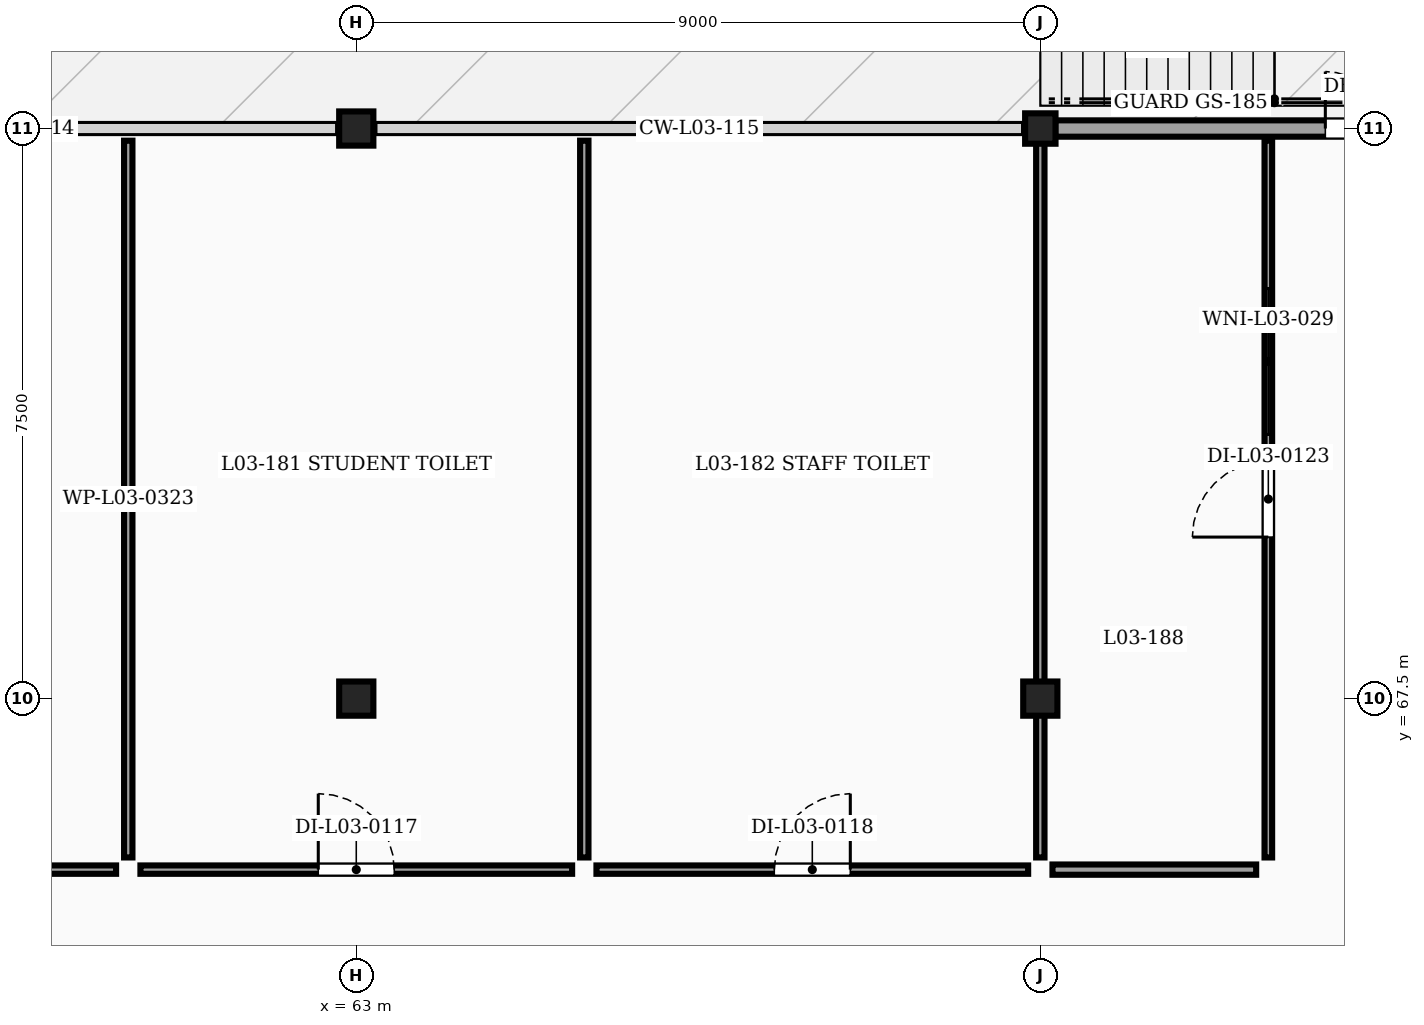
"""IFC4 building model, lengths in metres.
Left out: names, types, materials, properties, quantities, classifications, styles, units other than length and angle.
Written with IfcOpenShell. Run it as: python <this file> out.ifc"""

import sys

from ifc_helpers import new_model, si_unit, direction, frame, frame_2d, origin, origin_2d, place, context, subcontext, project, spatial, rectangle, extrude, element, fill, save


model = new_model("IFC4")
c1 = context("Model", 3, precision=1e-05, world=origin(), true_north=direction((0.0, 1.0)))
c2 = subcontext(c1, "Body", "Model", "MODEL_VIEW")
j1 = project(units=[si_unit("LENGTHUNIT", "METRE"), si_unit("PLANEANGLEUNIT", "RADIAN")], contexts=[c1])
p1 = place(None, origin())
s1 = spatial("IfcSite", under=j1, at=p1, CompositionType="ELEMENT")
p2 = place(p1, origin())
s2 = spatial("IfcBuilding", under=s1, at=p2, CompositionType="ELEMENT")
p3 = place(p2, frame((0.0, 0.0, 12.3)))
s3 = spatial("IfcBuildingStorey", under=s2, at=p3, CompositionType="ELEMENT", Elevation=12.3)
for number, where, z_axis, x_axis in (
    (1, (63.0, 67.5, 0.0), (0.0, 0.0, 1.0), (1.0, 0.0, 0.0)),
    (2, (72.0, 67.5, 0.0), (0.0, 0.0, 1.0), (1.0, 0.0, 0.0)),
    (3, (63.0, 75.0, 0.0), (0.0, 0.0, 1.0), (1.0, 0.0, 0.0)),
):
    element("IfcColumn", number, at=place(p3, frame(where, z_axis=z_axis, x_axis=x_axis)), inside=s3, PredefinedType="COLUMN", context=c2, shape_type="SweptSolid", body=[
        extrude(rectangle(XDim=0.45, YDim=0.45, at=origin_2d()), origin(), (0.0, 0.0, 1.0), 3.8),
    ])
p4 = place(p3, frame((72.0, 75.0, 0.0), z_axis=(0.0, 0.0, 1.0), x_axis=(1.0, 0.0, 0.0)))
e4 = element("IfcColumn", 4, at=p4, inside=s3, PredefinedType="COLUMN", context=c2, shape_type="SweptSolid", body=[
    extrude(rectangle(XDim=0.4, YDim=0.4, at=origin_2d()), origin(), (0.0, 0.0, 1.0), 3.8),
])
p5 = place(p3, frame((72.196, 75.0, 0.0), z_axis=(0.0, 0.0, 1.0), x_axis=(1.0, 0.0, 0.0)))
e5 = element("IfcWall", 5, at=p5, inside=s3, PredefinedType="SOLIDWALL", context=c2, shape_type="SweptSolid", body=[
    extrude(rectangle(XDim=8.608, YDim=0.215, at=frame_2d((4.304, 0.0))), origin(), (0.0, 0.0, 1.0), 3.047),
])
p6 = place(p5, frame((3.554, 0.0, 0.0)))
e6 = element("IfcOpeningElement", 6, at=p6, cuts=e5, PredefinedType="OPENING", context=c2, shape_type="SweptSolid", body=[
    extrude(rectangle(XDim=1.5, YDim=2.15, at=frame_2d((0.75, 1.075))), frame((0.0, 0.117, 0.0), z_axis=(0.0, -1.0, 0.0), x_axis=(1.0, 0.0, 0.0)), (0.0, 0.0, 1.0), 0.235),
])
p7 = place(p3, frame((60.0, 65.41, 0.0), z_axis=(0.0, 0.0, 1.0), x_axis=(0.0, 1.0, 0.0)))
e7 = element("IfcWall", 7, at=p7, inside=s3, PredefinedType="PARTITIONING", context=c2, shape_type="SweptSolid", body=[
    extrude(rectangle(XDim=9.43, YDim=0.11, at=frame_2d((4.715, 0.0))), origin(), (0.0, 0.0, 1.0), 3.222),
])
p8 = place(p3, frame((54.16, 65.25, 0.0), z_axis=(0.0, 0.0, 1.0), x_axis=(1.0, 0.0, 0.0)))
e8 = element("IfcWall", 8, at=p8, inside=s3, PredefinedType="PARTITIONING", context=c2, shape_type="SweptSolid", body=[
    extrude(rectangle(XDim=5.68, YDim=0.11, at=frame_2d((2.84, 0.0))), origin(), (0.0, 0.0, 1.0), 3.59),
])
p9 = place(p8, frame((2.34, 0.0, 0.0)))
e9 = element("IfcOpeningElement", 9, at=p9, cuts=e8, PredefinedType="OPENING", context=c2, shape_type="SweptSolid", body=[
    extrude(rectangle(XDim=1.0, YDim=2.15, at=frame_2d((0.5, 1.075))), frame((0.0, 0.065, 0.0), z_axis=(0.0, -1.0, 0.0), x_axis=(1.0, 0.0, 0.0)), (0.0, 0.0, 1.0), 0.13),
])
p10 = place(p3, frame((66.0, 65.41, 0.0), z_axis=(0.0, 0.0, 1.0), x_axis=(0.0, 1.0, 0.0)))
e10 = element("IfcWall", 10, at=p10, inside=s3, PredefinedType="PARTITIONING", context=c2, shape_type="SweptSolid", body=[
    extrude(rectangle(XDim=9.43, YDim=0.11, at=frame_2d((4.715, 0.0))), origin(), (0.0, 0.0, 1.0), 3.222),
])
p11 = place(p3, frame((60.16, 65.25, 0.0), z_axis=(0.0, 0.0, 1.0), x_axis=(1.0, 0.0, 0.0)))
e11 = element("IfcWall", 11, at=p11, inside=s3, PredefinedType="PARTITIONING", context=c2, shape_type="SweptSolid", body=[
    extrude(rectangle(XDim=5.68, YDim=0.11, at=frame_2d((2.84, 0.0))), origin(), (0.0, 0.0, 1.0), 3.59),
])
p12 = place(p11, frame((2.34, 0.0, 0.0)))
e12 = element("IfcOpeningElement", 12, at=p12, cuts=e11, PredefinedType="OPENING", context=c2, shape_type="SweptSolid", body=[
    extrude(rectangle(XDim=1.0, YDim=2.15, at=frame_2d((0.5, 1.075))), frame((0.0, 0.065, 0.0), z_axis=(0.0, -1.0, 0.0), x_axis=(1.0, 0.0, 0.0)), (0.0, 0.0, 1.0), 0.13),
])
p13 = place(p3, frame((66.16, 65.25, 0.0), z_axis=(0.0, 0.0, 1.0), x_axis=(1.0, 0.0, 0.0)))
e13 = element("IfcWall", 13, at=p13, inside=s3, PredefinedType="PARTITIONING", context=c2, shape_type="SweptSolid", body=[
    extrude(rectangle(XDim=5.68, YDim=0.11, at=frame_2d((2.84, 0.0))), origin(), (0.0, 0.0, 1.0), 3.59),
])
p14 = place(p13, frame((2.34, 0.0, 0.0)))
e14 = element("IfcOpeningElement", 14, at=p14, cuts=e13, PredefinedType="OPENING", context=c2, shape_type="SweptSolid", body=[
    extrude(rectangle(XDim=1.0, YDim=2.15, at=frame_2d((0.5, 1.075))), frame((0.0, 0.065, 0.0), z_axis=(0.0, -1.0, 0.0), x_axis=(1.0, 0.0, 0.0)), (0.0, 0.0, 1.0), 0.13),
])
p15 = place(p3, frame((72.0, 65.41, 0.0), z_axis=(0.0, 0.0, 1.0), x_axis=(0.0, 1.0, 0.0)))
e15 = element("IfcWall", 15, at=p15, inside=s3, PredefinedType="PARTITIONING", context=c2, shape_type="SweptSolid", body=[
    extrude(rectangle(XDim=9.43, YDim=0.11, at=frame_2d((4.715, 0.0))), origin(), (0.0, 0.0, 1.0), 2.862),
])
p16 = place(p3, frame((72.16, 65.25, 0.0), z_axis=(0.0, 0.0, 1.0), x_axis=(1.0, 0.0, 0.0)))
e16 = element("IfcWall", 16, at=p16, inside=s3, PredefinedType="PARTITIONING", context=c2, shape_type="SweptSolid", body=[
    extrude(rectangle(XDim=2.68, YDim=0.135, at=frame_2d((1.34, 0.0))), origin(), (0.0, 0.0, 1.0), 3.59),
])
p17 = place(p3, frame((75.0, 65.41, 0.0), z_axis=(0.0, 0.0, 1.0), x_axis=(0.0, 1.0, 0.0)))
e17 = element("IfcWall", 17, at=p17, inside=s3, PredefinedType="PARTITIONING", context=c2, shape_type="SweptSolid", body=[
    extrude(rectangle(XDim=9.43, YDim=0.1, at=frame_2d((4.715, 0.0))), origin(), (0.0, 0.0, 1.0), 3.222),
])
p18 = place(p17, frame((4.215, 0.0, 0.0)))
e18 = element("IfcOpeningElement", 18, at=p18, cuts=e17, PredefinedType="OPENING", context=c2, shape_type="SweptSolid", body=[
    extrude(rectangle(XDim=1.0, YDim=2.15, at=frame_2d((0.5, 1.075))), frame((0.0, 0.06, 0.0), z_axis=(0.0, -1.0, 0.0), x_axis=(1.0, 0.0, 0.0)), (0.0, 0.0, 1.0), 0.12),
])
p19 = place(p17, frame((5.565, 0.0, 1.02)))
e19 = element("IfcOpeningElement", 19, at=p19, cuts=e17, PredefinedType="OPENING", context=c2, shape_type="SweptSolid", body=[
    extrude(rectangle(XDim=1.92, YDim=1.24, at=frame_2d((0.96, 0.62))), frame((0.0, 0.06, 0.0), z_axis=(0.0, -1.0, 0.0), x_axis=(1.0, 0.0, 0.0)), (0.0, 0.0, 1.0), 0.12),
])
p20 = place(p6, origin())
e20 = element("IfcDoor", 20, at=p20, inside=s3, OperationType="DOUBLE_DOOR_SINGLE_SWING", PredefinedType="DOOR", context=c2, shape_type="SweptSolid", body=[
    extrude(rectangle(XDim=1.5, YDim=2.15, at=frame_2d((0.75, 1.075))), frame((0.0, 0.025, 0.0), z_axis=(0.0, -1.0, 0.0), x_axis=(1.0, 0.0, 0.0)), (0.0, 0.0, 1.0), 0.05),
])
fill(e6, e20)
p21 = place(p12, origin())
e21 = element("IfcDoor", 21, at=p21, inside=s3, OperationType="SINGLE_SWING_LEFT", PredefinedType="DOOR", context=c2, shape_type="SweptSolid", body=[
    extrude(rectangle(XDim=1.0, YDim=2.15, at=frame_2d((0.5, 1.075))), frame((0.0, 0.025, 0.0), z_axis=(0.0, -1.0, 0.0), x_axis=(1.0, 0.0, 0.0)), (0.0, 0.0, 1.0), 0.05),
])
fill(e12, e21)
p22 = place(p14, origin())
e22 = element("IfcDoor", 22, at=p22, inside=s3, OperationType="SINGLE_SWING_RIGHT", PredefinedType="DOOR", context=c2, shape_type="SweptSolid", body=[
    extrude(rectangle(XDim=1.0, YDim=2.15, at=frame_2d((0.5, 1.075))), frame((0.0, 0.025, 0.0), z_axis=(0.0, -1.0, 0.0), x_axis=(1.0, 0.0, 0.0)), (0.0, 0.0, 1.0), 0.05),
])
fill(e14, e22)
p23 = place(p18, origin())
e23 = element("IfcDoor", 23, at=p23, inside=s3, OperationType="SINGLE_SWING_LEFT", PredefinedType="DOOR", context=c2, shape_type="SweptSolid", body=[
    extrude(rectangle(XDim=1.0, YDim=2.15, at=frame_2d((0.5, 1.075))), frame((0.0, 0.025, 0.0), z_axis=(0.0, -1.0, 0.0), x_axis=(1.0, 0.0, 0.0)), (0.0, 0.0, 1.0), 0.05),
])
fill(e18, e23)
p24 = place(p19, origin())
e24 = element("IfcWindow", 24, at=p24, inside=s3, PartitioningType="DOUBLE_PANEL_VERTICAL", PredefinedType="WINDOW", context=c2, shape_type="SweptSolid", body=[
    extrude(rectangle(XDim=1.92, YDim=1.24, at=frame_2d((0.96, 0.62))), frame((0.0, 0.03, 0.0), z_axis=(0.0, -1.0, 0.0), x_axis=(1.0, 0.0, 0.0)), (0.0, 0.0, 1.0), 0.06),
])
fill(e19, e24)
save(model, sys.argv[1])
